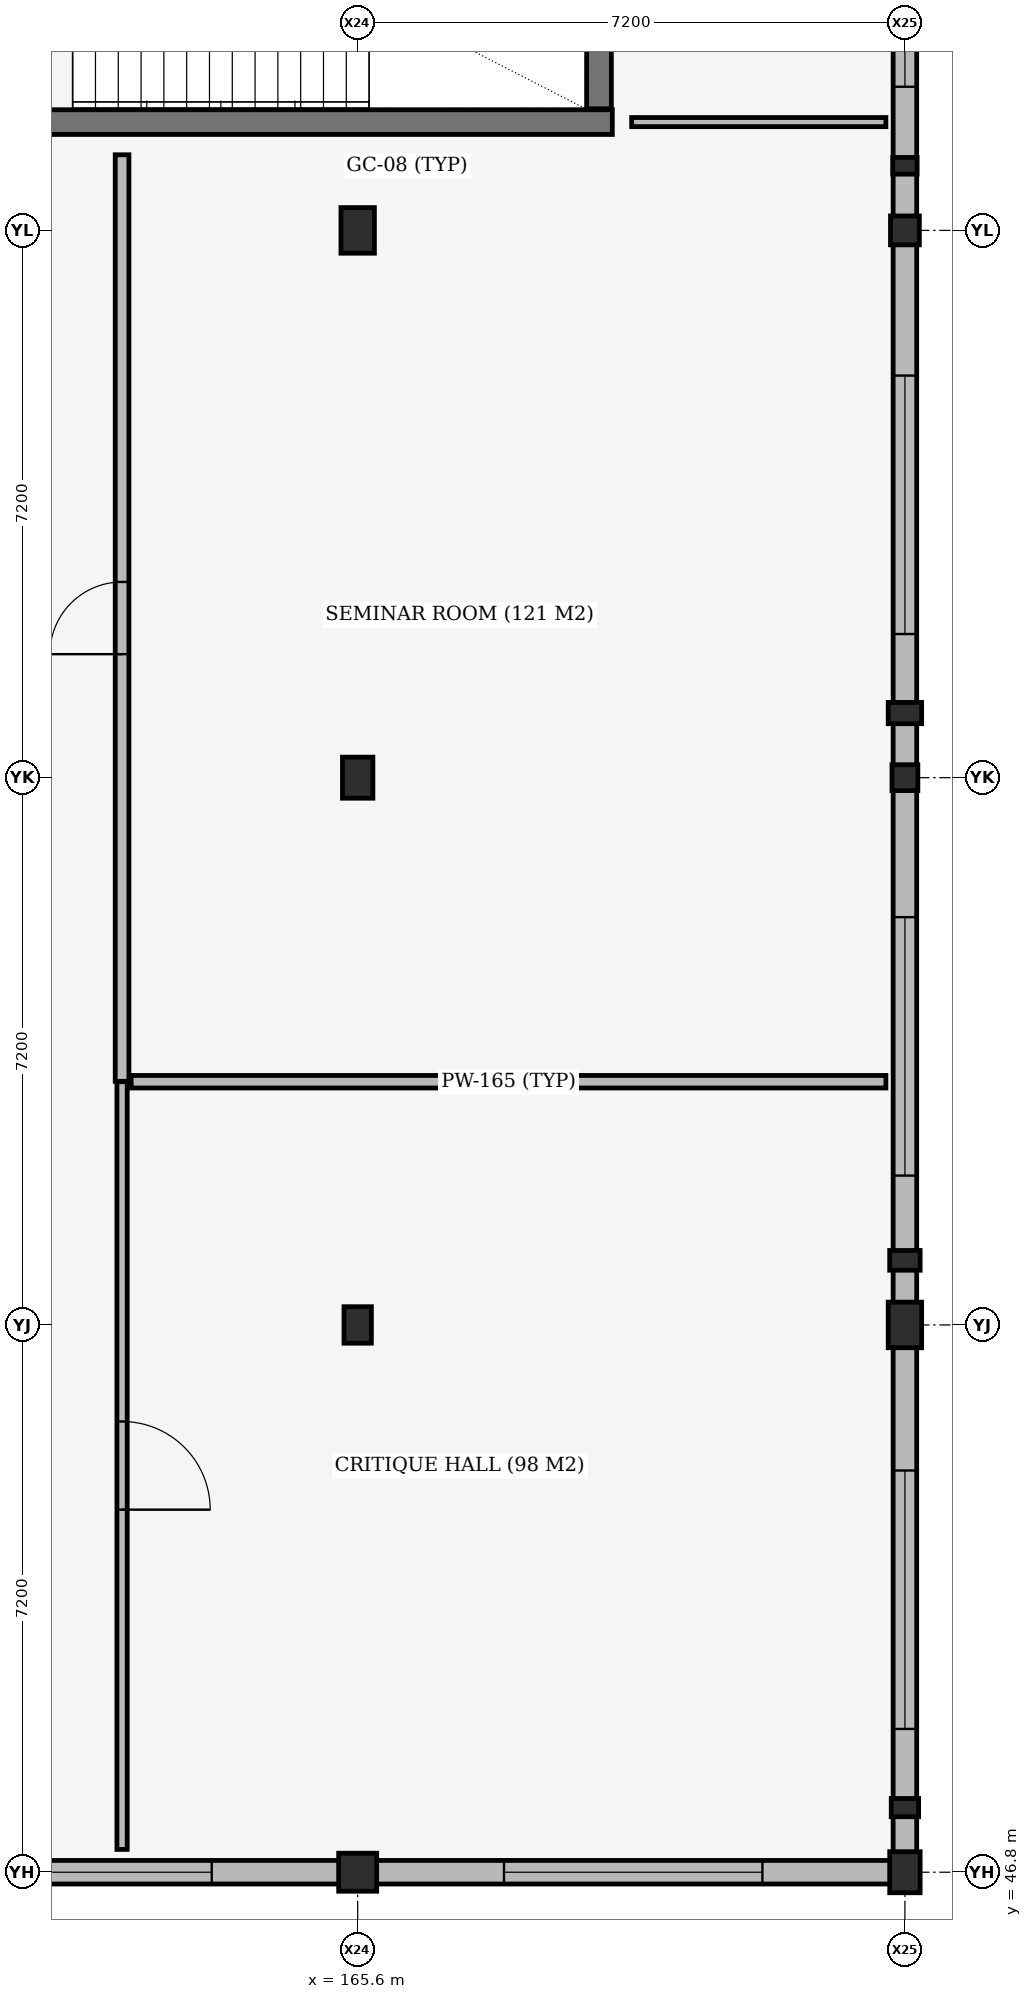
"""IFC4 building model, lengths in metres.
Left out: names, types, materials, properties, quantities, classifications, styles, units other than length and angle.
Written with IfcOpenShell. Run it as: python <this file> out.ifc"""

import sys

from ifc_helpers import new_model, si_unit, direction, frame, frame_2d, origin, origin_2d, place, context, subcontext, project, spatial, rectangle, extrude, element, fill, save


model = new_model("IFC4")
c1 = context("Model", 3, precision=1e-05, world=origin(), true_north=direction((0.0, 1.0)))
c2 = subcontext(c1, "Body", "Model", "MODEL_VIEW")
j1 = project(units=[si_unit("LENGTHUNIT", "METRE"), si_unit("PLANEANGLEUNIT", "RADIAN")], contexts=[c1])
p1 = place(None, origin())
s1 = spatial("IfcSite", under=j1, at=p1, CompositionType="ELEMENT")
p2 = place(p1, origin())
s2 = spatial("IfcBuilding", under=s1, at=p2, CompositionType="ELEMENT")
p3 = place(p2, frame((0.0, 0.0, 9.6)))
s3 = spatial("IfcBuildingStorey", under=s2, at=p3, CompositionType="ELEMENT", Elevation=9.6)
p4 = place(p3, frame((165.6, 46.8, 0.0), z_axis=(0.0, 0.0, 1.0), x_axis=(1.0, 0.0, 0.0)))
e1 = element("IfcColumn", 1, at=p4, inside=s3, PredefinedType="COLUMN", context=c2, shape_type="SweptSolid", body=[
    extrude(rectangle(XDim=0.5, YDim=0.5, at=origin_2d()), origin(), (0.0, 0.0, 1.0), 3.92),
])
p5 = place(p3, frame((165.6, 54.0, 0.0), z_axis=(0.0, 0.0, 1.0), x_axis=(1.0, 0.0, 0.0)))
e2 = element("IfcColumn", 2, at=p5, inside=s3, PredefinedType="COLUMN", context=c2, shape_type="SweptSolid", body=[
    extrude(rectangle(XDim=0.36, YDim=0.48, at=origin_2d()), origin(), (0.0, 0.0, 1.0), 3.92),
])
p6 = place(p3, frame((165.6, 61.2, 0.0), z_axis=(0.0, 0.0, 1.0), x_axis=(1.0, 0.0, 0.0)))
e3 = element("IfcColumn", 3, at=p6, inside=s3, PredefinedType="COLUMN", context=c2, shape_type="SweptSolid", body=[
    extrude(rectangle(XDim=0.4, YDim=0.54, at=origin_2d()), origin(), (0.0, 0.0, 1.0), 3.92),
])
p7 = place(p3, frame((165.6, 68.4, 0.0), z_axis=(0.0, 0.0, 1.0), x_axis=(1.0, 0.0, 0.0)))
e4 = element("IfcColumn", 4, at=p7, inside=s3, PredefinedType="COLUMN", context=c2, shape_type="SweptSolid", body=[
    extrude(rectangle(XDim=0.44, YDim=0.6, at=origin_2d()), origin(), (0.0, 0.0, 1.0), 3.92),
])
p8 = place(p3, frame((172.8, 46.8, 0.0), z_axis=(0.0, 0.0, 1.0), x_axis=(1.0, 0.0, 0.0)))
e5 = element("IfcColumn", 5, at=p8, inside=s3, PredefinedType="COLUMN", context=c2, shape_type="SweptSolid", body=[
    extrude(rectangle(XDim=0.4, YDim=0.54, at=origin_2d()), origin(), (0.0, 0.0, 1.0), 3.92),
])
p9 = place(p3, frame((172.8, 54.0, 0.0), z_axis=(0.0, 0.0, 1.0), x_axis=(1.0, 0.0, 0.0)))
e6 = element("IfcColumn", 6, at=p9, inside=s3, PredefinedType="COLUMN", context=c2, shape_type="SweptSolid", body=[
    extrude(rectangle(XDim=0.44, YDim=0.6, at=origin_2d()), origin(), (0.0, 0.0, 1.0), 3.92),
])
p10 = place(p3, frame((172.8, 61.2, 0.0), z_axis=(0.0, 0.0, 1.0), x_axis=(1.0, 0.0, 0.0)))
e7 = element("IfcColumn", 7, at=p10, inside=s3, PredefinedType="COLUMN", context=c2, shape_type="SweptSolid", body=[
    extrude(rectangle(XDim=0.34, YDim=0.34, at=origin_2d()), origin(), (0.0, 0.0, 1.0), 3.92),
])
p11 = place(p3, frame((172.8, 68.4, 0.0), z_axis=(0.0, 0.0, 1.0), x_axis=(1.0, 0.0, 0.0)))
e8 = element("IfcColumn", 8, at=p11, inside=s3, PredefinedType="COLUMN", context=c2, shape_type="SweptSolid", body=[
    extrude(rectangle(XDim=0.38, YDim=0.38, at=origin_2d()), origin(), (0.0, 0.0, 1.0), 3.92),
])
p12 = place(p3, frame((172.8, 47.65, 0.0), z_axis=(0.0, 0.0, 1.0), x_axis=(1.0, 0.0, 0.0)))
e9 = element("IfcColumn", 9, at=p12, inside=s3, PredefinedType="PILASTER", context=c2, shape_type="SweptSolid", body=[
    extrude(rectangle(XDim=0.36, YDim=0.24, at=origin_2d()), origin(), (0.0, 0.0, 1.0), 3.92),
])
p13 = place(p3, frame((172.8, 54.85, 0.0), z_axis=(0.0, 0.0, 1.0), x_axis=(1.0, 0.0, 0.0)))
e10 = element("IfcColumn", 10, at=p13, inside=s3, PredefinedType="PILASTER", context=c2, shape_type="SweptSolid", body=[
    extrude(rectangle(XDim=0.4, YDim=0.26, at=origin_2d()), origin(), (0.0, 0.0, 1.0), 3.92),
])
p14 = place(p3, frame((172.8, 62.05, 0.0), z_axis=(0.0, 0.0, 1.0), x_axis=(1.0, 0.0, 0.0)))
e11 = element("IfcColumn", 11, at=p14, inside=s3, PredefinedType="PILASTER", context=c2, shape_type="SweptSolid", body=[
    extrude(rectangle(XDim=0.44, YDim=0.28, at=origin_2d()), origin(), (0.0, 0.0, 1.0), 3.92),
])
p15 = place(p3, frame((172.8, 69.25, 0.0), z_axis=(0.0, 0.0, 1.0), x_axis=(1.0, 0.0, 0.0)))
e12 = element("IfcColumn", 12, at=p15, inside=s3, PredefinedType="PILASTER", context=c2, shape_type="SweptSolid", body=[
    extrude(rectangle(XDim=0.32, YDim=0.22, at=origin_2d()), origin(), (0.0, 0.0, 1.0), 3.92),
])
p16 = place(p3, frame((159.85, 69.825, 0.0), z_axis=(0.0, 0.0, 1.0), x_axis=(1.0, 0.0, 0.0)))
e13 = element("IfcWall", 13, at=p16, inside=s3, PredefinedType="SHEAR", context=c2, shape_type="SweptSolid", body=[
    extrude(rectangle(XDim=9.1, YDim=0.325, at=frame_2d((4.55, 0.0))), origin(), (0.0, 0.0, 1.0), 3.92),
])
p17 = place(p3, frame((168.775, 70.0, 0.0), z_axis=(0.0, 0.0, 1.0), x_axis=(0.0, 1.0, 0.0)))
e14 = element("IfcWall", 14, at=p17, inside=s3, PredefinedType="SHEAR", context=c2, shape_type="SweptSolid", body=[
    extrude(rectangle(XDim=3.45, YDim=0.325, at=frame_2d((1.725, 0.0))), origin(), (0.0, 0.0, 1.0), 3.92),
])
p18 = place(p3, frame((165.358, 46.8, 0.0), z_axis=(0.0, 0.0, 1.0), x_axis=(-1.0, 0.0, 0.0)))
e15 = element("IfcWall", 15, at=p18, inside=s3, PredefinedType="STANDARD", context=c2, shape_type="SweptSolid", body=[
    extrude(rectangle(XDim=6.756, YDim=0.31, at=frame_2d((3.378, 0.0))), origin(), (0.0, 0.0, 1.0), 3.34),
])
p19 = place(p18, frame((1.678, 0.0, 0.9)))
e16 = element("IfcOpeningElement", 16, at=p19, cuts=e15, PredefinedType="OPENING", context=c2, shape_type="SweptSolid", body=[
    extrude(rectangle(XDim=3.4, YDim=1.5, at=frame_2d((1.7, 0.75))), frame((0.0, 0.165, 0.0), z_axis=(0.0, -1.0, 0.0), x_axis=(1.0, 0.0, 0.0)), (0.0, 0.0, 1.0), 0.33),
])
p20 = place(p3, frame((172.608, 46.8, 0.0), z_axis=(0.0, 0.0, 1.0), x_axis=(-1.0, 0.0, 0.0)))
e17 = element("IfcWall", 17, at=p20, inside=s3, PredefinedType="STANDARD", context=c2, shape_type="SweptSolid", body=[
    extrude(rectangle(XDim=6.766, YDim=0.31, at=frame_2d((3.383, 0.0))), origin(), (0.0, 0.0, 1.0), 3.28),
])
p21 = place(p20, frame((1.683, 0.0, 0.9)))
e18 = element("IfcOpeningElement", 18, at=p21, cuts=e17, PredefinedType="OPENING", context=c2, shape_type="SweptSolid", body=[
    extrude(rectangle(XDim=3.4, YDim=1.5, at=frame_2d((1.7, 0.75))), frame((0.0, 0.165, 0.0), z_axis=(0.0, -1.0, 0.0), x_axis=(1.0, 0.0, 0.0)), (0.0, 0.0, 1.0), 0.33),
])
p22 = place(p3, frame((172.8, 53.708, 0.0), z_axis=(0.0, 0.0, 1.0), x_axis=(0.0, -1.0, 0.0)))
e19 = element("IfcWall", 19, at=p22, inside=s3, PredefinedType="STANDARD", context=c2, shape_type="SweptSolid", body=[
    extrude(rectangle(XDim=6.646, YDim=0.31, at=frame_2d((3.323, 0.0))), origin(), (0.0, 0.0, 1.0), 3.34),
])
p23 = place(p22, frame((1.623, 0.0, 0.9)))
e20 = element("IfcOpeningElement", 20, at=p23, cuts=e19, PredefinedType="OPENING", context=c2, shape_type="SweptSolid", body=[
    extrude(rectangle(XDim=3.4, YDim=1.5, at=frame_2d((1.7, 0.75))), frame((0.0, 0.165, 0.0), z_axis=(0.0, -1.0, 0.0), x_axis=(1.0, 0.0, 0.0)), (0.0, 0.0, 1.0), 0.33),
])
p24 = place(p3, frame((172.8, 61.038, 0.0), z_axis=(0.0, 0.0, 1.0), x_axis=(0.0, -1.0, 0.0)))
e21 = element("IfcWall", 21, at=p24, inside=s3, PredefinedType="STANDARD", context=c2, shape_type="SweptSolid", body=[
    extrude(rectangle(XDim=6.746, YDim=0.31, at=frame_2d((3.373, 0.0))), origin(), (0.0, 0.0, 1.0), 3.28),
])
p25 = place(p24, frame((1.673, 0.0, 0.9)))
e22 = element("IfcOpeningElement", 22, at=p25, cuts=e21, PredefinedType="OPENING", context=c2, shape_type="SweptSolid", body=[
    extrude(rectangle(XDim=3.4, YDim=1.5, at=frame_2d((1.7, 0.75))), frame((0.0, 0.165, 0.0), z_axis=(0.0, -1.0, 0.0), x_axis=(1.0, 0.0, 0.0)), (0.0, 0.0, 1.0), 0.33),
])
p26 = place(p3, frame((172.8, 68.218, 0.0), z_axis=(0.0, 0.0, 1.0), x_axis=(0.0, -1.0, 0.0)))
e23 = element("IfcWall", 23, at=p26, inside=s3, PredefinedType="STANDARD", context=c2, shape_type="SweptSolid", body=[
    extrude(rectangle(XDim=6.856, YDim=0.31, at=frame_2d((3.428, 0.0))), origin(), (0.0, 0.0, 1.0), 3.24),
])
p27 = place(p26, frame((1.728, 0.0, 0.9)))
e24 = element("IfcOpeningElement", 24, at=p27, cuts=e23, PredefinedType="OPENING", context=c2, shape_type="SweptSolid", body=[
    extrude(rectangle(XDim=3.4, YDim=1.5, at=frame_2d((1.7, 0.75))), frame((0.0, 0.165, 0.0), z_axis=(0.0, -1.0, 0.0), x_axis=(1.0, 0.0, 0.0)), (0.0, 0.0, 1.0), 0.33),
])
p28 = place(p3, frame((172.8, 75.398, 0.0), z_axis=(0.0, 0.0, 1.0), x_axis=(0.0, -1.0, 0.0)))
e25 = element("IfcWall", 25, at=p28, inside=s3, PredefinedType="STANDARD", context=c2, shape_type="SweptSolid", body=[
    extrude(rectangle(XDim=6.816, YDim=0.31, at=frame_2d((3.408, 0.0))), origin(), (0.0, 0.0, 1.0), 3.18),
])
p29 = place(p28, frame((1.708, 0.0, 0.9)))
e26 = element("IfcOpeningElement", 26, at=p29, cuts=e25, PredefinedType="OPENING", context=c2, shape_type="SweptSolid", body=[
    extrude(rectangle(XDim=3.4, YDim=1.5, at=frame_2d((1.7, 0.75))), frame((0.0, 0.165, 0.0), z_axis=(0.0, -1.0, 0.0), x_axis=(1.0, 0.0, 0.0)), (0.0, 0.0, 1.0), 0.33),
])
p30 = place(p3, frame((162.5, 47.1, 0.0), z_axis=(0.0, 0.0, 1.0), x_axis=(0.0, 1.0, 0.0)))
e27 = element("IfcWall", 27, at=p30, inside=s3, PredefinedType="PARTITIONING", context=c2, shape_type="SweptSolid", body=[
    extrude(rectangle(XDim=10.1, YDim=0.135, at=frame_2d((5.05, 0.0))), origin(), (0.0, 0.0, 1.0), 3.24),
])
p31 = place(p30, frame((4.47, 0.0, 0.0)))
e28 = element("IfcOpeningElement", 28, at=p31, cuts=e27, PredefinedType="OPENING", context=c2, shape_type="SweptSolid", body=[
    extrude(rectangle(XDim=1.16, YDim=2.2, at=frame_2d((0.58, 1.1))), frame((0.0, 0.077, 0.0), z_axis=(0.0, -1.0, 0.0), x_axis=(1.0, 0.0, 0.0)), (0.0, 0.0, 1.0), 0.155),
])
p32 = place(p3, frame((162.62, 57.2, 0.0), z_axis=(0.0, 0.0, 1.0), x_axis=(1.0, 0.0, 0.0)))
e29 = element("IfcWall", 29, at=p32, inside=s3, PredefinedType="PARTITIONING", context=c2, shape_type="SweptSolid", body=[
    extrude(rectangle(XDim=9.93, YDim=0.165, at=frame_2d((4.965, 0.0))), origin(), (0.0, 0.0, 1.0), 3.4),
])
p33 = place(p3, frame((162.5, 57.205, 0.0), z_axis=(0.0, 0.0, 1.0), x_axis=(0.0, 1.0, 0.0)))
e30 = element("IfcWall", 30, at=p33, inside=s3, PredefinedType="PARTITIONING", context=c2, shape_type="SweptSolid", body=[
    extrude(rectangle(XDim=12.19, YDim=0.18, at=frame_2d((6.095, 0.0))), origin(), (0.0, 0.0, 1.0), 3.18),
])
p34 = place(p33, frame((5.62, 0.0, 0.0)))
e31 = element("IfcOpeningElement", 31, at=p34, cuts=e30, PredefinedType="OPENING", context=c2, shape_type="SweptSolid", body=[
    extrude(rectangle(XDim=0.95, YDim=2.15, at=frame_2d((0.475, 1.075))), frame((0.0, 0.1, 0.0), z_axis=(0.0, -1.0, 0.0), x_axis=(1.0, 0.0, 0.0)), (0.0, 0.0, 1.0), 0.2),
])
p35 = place(p3, frame((169.205, 69.825, 0.0), z_axis=(0.0, 0.0, 1.0), x_axis=(1.0, 0.0, 0.0)))
e32 = element("IfcWall", 32, at=p35, inside=s3, PredefinedType="PARTITIONING", context=c2, shape_type="SweptSolid", body=[
    extrude(rectangle(XDim=3.345, YDim=0.12, at=frame_2d((1.672, 0.0))), origin(), (0.0, 0.0, 1.0), 3.72),
])
p36 = place(p19, origin())
e33 = element("IfcWindow", 33, at=p36, inside=s3, PartitioningType="DOUBLE_PANEL_VERTICAL", PredefinedType="WINDOW", context=c2, shape_type="SweptSolid", body=[
    extrude(rectangle(XDim=3.4, YDim=1.5, at=frame_2d((1.7, 0.75))), frame((0.0, 0.03, 0.0), z_axis=(0.0, -1.0, 0.0), x_axis=(1.0, 0.0, 0.0)), (0.0, 0.0, 1.0), 0.06),
])
fill(e16, e33)
p37 = place(p21, origin())
e34 = element("IfcWindow", 34, at=p37, inside=s3, PartitioningType="DOUBLE_PANEL_VERTICAL", PredefinedType="WINDOW", context=c2, shape_type="SweptSolid", body=[
    extrude(rectangle(XDim=3.4, YDim=1.5, at=frame_2d((1.7, 0.75))), frame((0.0, 0.03, 0.0), z_axis=(0.0, -1.0, 0.0), x_axis=(1.0, 0.0, 0.0)), (0.0, 0.0, 1.0), 0.06),
])
fill(e18, e34)
p38 = place(p23, origin())
e35 = element("IfcWindow", 35, at=p38, inside=s3, PartitioningType="DOUBLE_PANEL_VERTICAL", PredefinedType="WINDOW", context=c2, shape_type="SweptSolid", body=[
    extrude(rectangle(XDim=3.4, YDim=1.5, at=frame_2d((1.7, 0.75))), frame((0.0, 0.03, 0.0), z_axis=(0.0, -1.0, 0.0), x_axis=(1.0, 0.0, 0.0)), (0.0, 0.0, 1.0), 0.06),
])
fill(e20, e35)
p39 = place(p25, origin())
e36 = element("IfcWindow", 36, at=p39, inside=s3, PartitioningType="DOUBLE_PANEL_VERTICAL", PredefinedType="WINDOW", context=c2, shape_type="SweptSolid", body=[
    extrude(rectangle(XDim=3.4, YDim=1.5, at=frame_2d((1.7, 0.75))), frame((0.0, 0.03, 0.0), z_axis=(0.0, -1.0, 0.0), x_axis=(1.0, 0.0, 0.0)), (0.0, 0.0, 1.0), 0.06),
])
fill(e22, e36)
p40 = place(p27, origin())
e37 = element("IfcWindow", 37, at=p40, inside=s3, PartitioningType="DOUBLE_PANEL_VERTICAL", PredefinedType="WINDOW", context=c2, shape_type="SweptSolid", body=[
    extrude(rectangle(XDim=3.4, YDim=1.5, at=frame_2d((1.7, 0.75))), frame((0.0, 0.03, 0.0), z_axis=(0.0, -1.0, 0.0), x_axis=(1.0, 0.0, 0.0)), (0.0, 0.0, 1.0), 0.06),
])
fill(e24, e37)
p41 = place(p29, origin())
e38 = element("IfcWindow", 38, at=p41, inside=s3, PartitioningType="DOUBLE_PANEL_VERTICAL", PredefinedType="WINDOW", context=c2, shape_type="SweptSolid", body=[
    extrude(rectangle(XDim=3.4, YDim=1.5, at=frame_2d((1.7, 0.75))), frame((0.0, 0.03, 0.0), z_axis=(0.0, -1.0, 0.0), x_axis=(1.0, 0.0, 0.0)), (0.0, 0.0, 1.0), 0.06),
])
fill(e26, e38)
p42 = place(p31, origin())
e39 = element("IfcDoor", 39, at=p42, inside=s3, OperationType="SINGLE_SWING_RIGHT", PredefinedType="DOOR", context=c2, shape_type="SweptSolid", body=[
    extrude(rectangle(XDim=1.16, YDim=2.2, at=frame_2d((0.58, 1.1))), frame((0.0, 0.025, 0.0), z_axis=(0.0, -1.0, 0.0), x_axis=(1.0, 0.0, 0.0)), (0.0, 0.0, 1.0), 0.05),
])
fill(e28, e39)
p43 = place(p34, origin())
e40 = element("IfcDoor", 40, at=p43, inside=s3, OperationType="SINGLE_SWING_LEFT", PredefinedType="DOOR", context=c2, shape_type="SweptSolid", body=[
    extrude(rectangle(XDim=0.95, YDim=2.15, at=frame_2d((0.475, 1.075))), frame((0.0, 0.025, 0.0), z_axis=(0.0, -1.0, 0.0), x_axis=(1.0, 0.0, 0.0)), (0.0, 0.0, 1.0), 0.05),
])
fill(e31, e40)
save(model, sys.argv[1])
